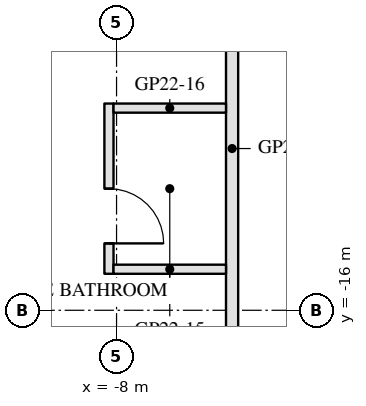
"""IFC4 building model, lengths in metres.
Left out: names, types, materials, properties, quantities, classifications, styles, units other than length and angle.
Written with IfcOpenShell. Run it as: python <this file> out.ifc"""

import sys

from ifc_helpers import new_model, si_unit, direction, frame, frame_2d, origin, place, context, subcontext, project, spatial, rectangle, extrude, element, fill, save


model = new_model("IFC4")
c1 = context("Model", 3, precision=1e-05, world=origin(), true_north=direction((0.0, 1.0)))
c2 = subcontext(c1, "Body", "Model", "MODEL_VIEW")
j1 = project(units=[si_unit("LENGTHUNIT", "METRE"), si_unit("PLANEANGLEUNIT", "RADIAN")], contexts=[c1])
p1 = place(None, origin())
s1 = spatial("IfcSite", under=j1, at=p1, CompositionType="ELEMENT")
p2 = place(p1, origin())
s2 = spatial("IfcBuilding", under=s1, at=p2, CompositionType="ELEMENT")
p3 = place(p2, frame((0.0, 0.0, 224.3)))
s3 = spatial("IfcBuildingStorey", under=s2, at=p3, CompositionType="ELEMENT", Elevation=224.3)
p4 = place(p3, frame((-8.547, -10.997, 0.0), z_axis=(0.0, 0.0, 1.0), x_axis=(-0.866025009528, -0.500000682871, 0.0)))
e1 = element("IfcWall", 1, at=p4, inside=s3, PredefinedType="SHEAR", context=c2, shape_type="SweptSolid", body=[
    extrude(rectangle(XDim=14.837, YDim=0.5, at=frame_2d((7.418, 0.0))), origin(), (0.0, 0.0, 1.0), 3.5),
])
p5 = place(p3, frame((-6.1, -18.38, 0.0), z_axis=(0.0, 0.0, 1.0), x_axis=(0.0, 1.0, 0.0)))
e2 = element("IfcWall", 2, at=p5, inside=s3, PredefinedType="PARTITIONING", context=c2, shape_type="SweptSolid", body=[
    extrude(rectangle(XDim=10.08, YDim=0.2, at=frame_2d((5.04, 0.0))), origin(), (0.0, 0.0, 1.0), 3.06),
])
p6 = place(p3, frame((-8.125, -12.6, 0.0), z_axis=(0.0, 0.0, 1.0), x_axis=(0.0, -1.0, 0.0)))
e3 = element("IfcWall", 3, at=p6, inside=s3, PredefinedType="PARTITIONING", context=c2, shape_type="SweptSolid", body=[
    extrude(rectangle(XDim=2.8, YDim=0.15, at=frame_2d((1.4, 0.0))), origin(), (0.0, 0.0, 1.0), 3.55),
])
p7 = place(p6, frame((1.4, 0.0, 0.0)))
e4 = element("IfcOpeningElement", 4, at=p7, cuts=e3, PredefinedType="OPENING", context=c2, shape_type="SweptSolid", body=[
    extrude(rectangle(XDim=0.9, YDim=2.1, at=frame_2d((0.45, 1.05))), frame((0.0, 0.085, 0.0), z_axis=(0.0, -1.0, 0.0), x_axis=(1.0, 0.0, 0.0)), (0.0, 0.0, 1.0), 0.17),
])
for number, where, z_axis, x_axis in (
    (5, (-8.05, -15.325, 0.0), (0.0, 0.0, 1.0), (1.0, 0.0, 0.0)),
    (6, (-8.05, -12.675, 0.0), (0.0, 0.0, 1.0), (1.0, 0.0, 0.0)),
):
    element("IfcWall", number, at=place(p3, frame(where, z_axis=z_axis, x_axis=x_axis)), inside=s3, PredefinedType="PARTITIONING", context=c2, shape_type="SweptSolid", body=[
        extrude(rectangle(XDim=1.85, YDim=0.15, at=frame_2d((0.925, 0.0))), origin(), (0.0, 0.0, 1.0), 2.95),
    ])
p8 = place(p7, origin())
e7 = element("IfcDoor", 7, at=p8, inside=s3, OperationType="SINGLE_SWING_RIGHT", PredefinedType="DOOR", context=c2, shape_type="SweptSolid", body=[
    extrude(rectangle(XDim=0.9, YDim=2.1, at=frame_2d((0.45, 1.05))), frame((0.0, 0.025, 0.0), z_axis=(0.0, -1.0, 0.0), x_axis=(1.0, 0.0, 0.0)), (0.0, 0.0, 1.0), 0.05),
])
fill(e4, e7)
save(model, sys.argv[1])
